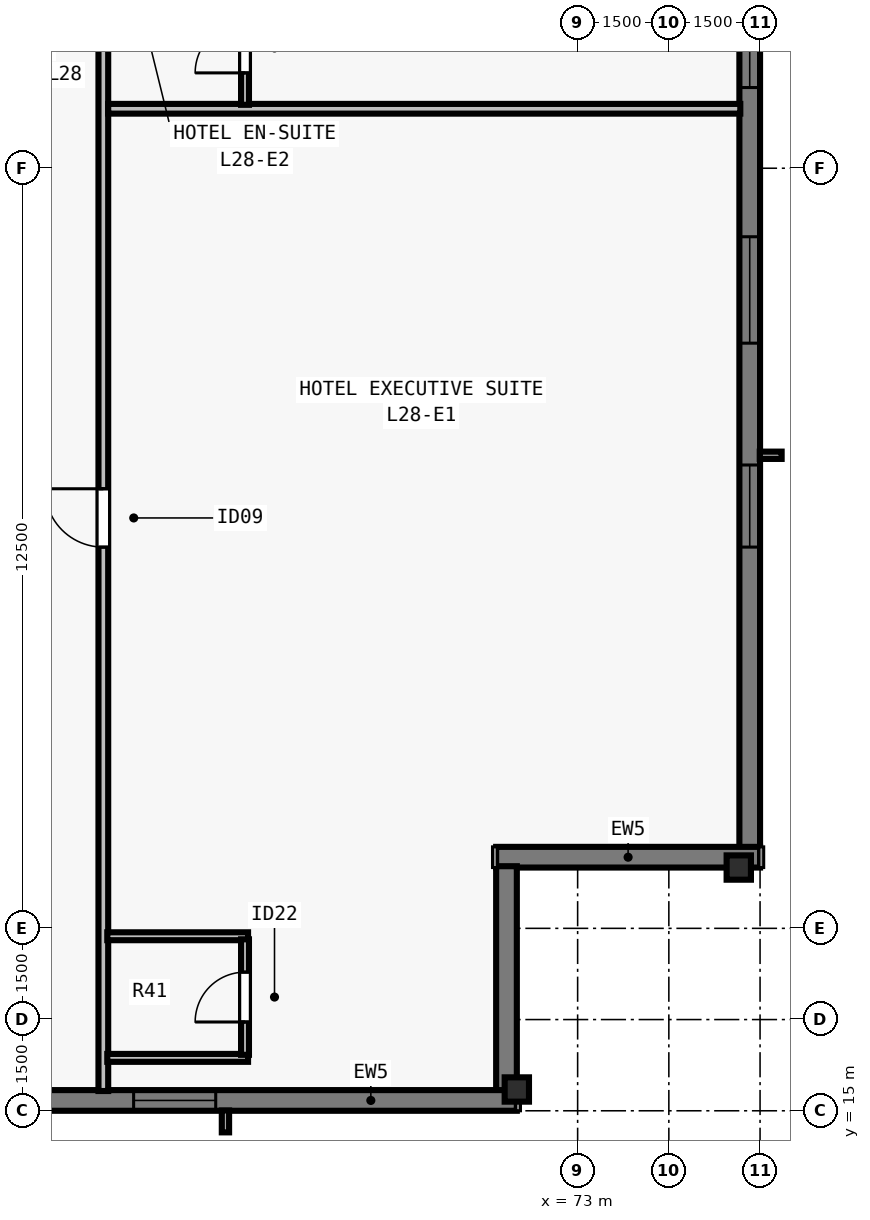
"""IFC4 building model, lengths in metres.
Left out: names, types, materials, properties, quantities, classifications, styles, units other than length and angle.
Written with IfcOpenShell. Run it as: python <this file> out.ifc"""

import sys

from ifc_helpers import new_model, si_unit, direction, frame, frame_2d, origin, origin_2d, place, context, subcontext, project, spatial, rectangle, i_section, extrude, element, fill, save


model = new_model("IFC4")
c1 = context("Model", 3, precision=1e-05, world=origin(), true_north=direction((0.0, 1.0)))
c2 = subcontext(c1, "Body", "Model", "MODEL_VIEW")
j1 = project(units=[si_unit("LENGTHUNIT", "METRE"), si_unit("PLANEANGLEUNIT", "RADIAN")], contexts=[c1])
p1 = place(None, origin())
s1 = spatial("IfcSite", under=j1, at=p1, CompositionType="ELEMENT")
p2 = place(p1, origin())
s2 = spatial("IfcBuilding", under=s1, at=p2, CompositionType="ELEMENT")
p3 = place(p2, frame((0.0, 0.0, 106.0)))
s3 = spatial("IfcBuildingStorey", under=s2, at=p3, CompositionType="ELEMENT", Elevation=106.0)
for number, where, z_axis, x_axis in (
    (1, (72.0, 15.35, 0.0), (0.0, 0.0, 1.0), (1.0, 0.0, 0.0)),
    (2, (75.65, 19.0, 0.0), (0.0, 0.0, 1.0), (0.0, 1.0, 0.0)),
):
    element("IfcColumn", number, at=place(p3, frame(where, z_axis=z_axis, x_axis=x_axis)), inside=s3, PredefinedType="COLUMN", context=c2, shape_type="SweptSolid", body=[
        extrude(i_section(OverallWidth=0.4, OverallDepth=0.4, WebThickness=0.022, FlangeThickness=0.036, at=origin_2d()), origin(), (0.0, 0.0, 1.0), 3.5),
    ])
p4 = place(p3, frame((75.83, 59.0, 0.0), z_axis=(0.0, 0.0, 1.0), x_axis=(0.0, -1.0, 0.0)))
e3 = element("IfcWall", 3, at=p4, inside=s3, PredefinedType="SOLIDWALL", context=c2, shape_type="SweptSolid", body=[
    extrude(rectangle(XDim=39.682, YDim=0.34, at=frame_2d((19.841, 0.0))), origin(), (0.0, 0.0, 1.0), 3.28),
])
p5 = place(p4, frame((4.952, 0.0, 0.8)))
e4 = element("IfcOpeningElement", 4, at=p5, cuts=e3, PredefinedType="OPENING", context=c2, shape_type="SweptSolid", body=[
    extrude(rectangle(XDim=1.35, YDim=1.66, at=frame_2d((0.675, 0.83))), frame((0.0, 0.18, 0.0), z_axis=(0.0, -1.0, 0.0), x_axis=(1.0, 0.0, 0.0)), (0.0, 0.0, 1.0), 0.36),
])
p6 = place(p4, frame((8.305, 0.0, 0.8)))
e5 = element("IfcOpeningElement", 5, at=p6, cuts=e3, PredefinedType="OPENING", context=c2, shape_type="SweptSolid", body=[
    extrude(rectangle(XDim=1.75, YDim=1.66, at=frame_2d((0.875, 0.83))), frame((0.0, 0.18, 0.0), z_axis=(0.0, -1.0, 0.0), x_axis=(1.0, 0.0, 0.0)), (0.0, 0.0, 1.0), 0.36),
])
p7 = place(p4, frame((12.909, 0.0, 0.8)))
e6 = element("IfcOpeningElement", 6, at=p7, cuts=e3, PredefinedType="OPENING", context=c2, shape_type="SweptSolid", body=[
    extrude(rectangle(XDim=1.35, YDim=1.66, at=frame_2d((0.675, 0.83))), frame((0.0, 0.18, 0.0), z_axis=(0.0, -1.0, 0.0), x_axis=(1.0, 0.0, 0.0)), (0.0, 0.0, 1.0), 0.36),
])
p8 = place(p4, frame((16.262, 0.0, 0.8)))
e7 = element("IfcOpeningElement", 7, at=p8, cuts=e3, PredefinedType="OPENING", context=c2, shape_type="SweptSolid", body=[
    extrude(rectangle(XDim=1.75, YDim=1.66, at=frame_2d((0.875, 0.83))), frame((0.0, 0.18, 0.0), z_axis=(0.0, -1.0, 0.0), x_axis=(1.0, 0.0, 0.0)), (0.0, 0.0, 1.0), 0.36),
])
p9 = place(p4, frame((19.166, 0.0, 0.8)))
e8 = element("IfcOpeningElement", 8, at=p9, cuts=e3, PredefinedType="OPENING", context=c2, shape_type="SweptSolid", body=[
    extrude(rectangle(XDim=1.35, YDim=1.66, at=frame_2d((0.675, 0.83))), frame((0.0, 0.18, 0.0), z_axis=(0.0, -1.0, 0.0), x_axis=(1.0, 0.0, 0.0)), (0.0, 0.0, 1.0), 0.36),
])
p10 = place(p4, frame((22.07, 0.0, 0.8)))
e9 = element("IfcOpeningElement", 9, at=p10, cuts=e3, PredefinedType="OPENING", context=c2, shape_type="SweptSolid", body=[
    extrude(rectangle(XDim=1.75, YDim=1.66, at=frame_2d((0.875, 0.83))), frame((0.0, 0.18, 0.0), z_axis=(0.0, -1.0, 0.0), x_axis=(1.0, 0.0, 0.0)), (0.0, 0.0, 1.0), 0.36),
])
p11 = place(p4, frame((25.823, 0.0, 0.8)))
e10 = element("IfcOpeningElement", 10, at=p11, cuts=e3, PredefinedType="OPENING", context=c2, shape_type="SweptSolid", body=[
    extrude(rectangle(XDim=1.35, YDim=1.66, at=frame_2d((0.675, 0.83))), frame((0.0, 0.18, 0.0), z_axis=(0.0, -1.0, 0.0), x_axis=(1.0, 0.0, 0.0)), (0.0, 0.0, 1.0), 0.36),
])
p12 = place(p4, frame((29.627, 0.0, 0.8)))
e11 = element("IfcOpeningElement", 11, at=p12, cuts=e3, PredefinedType="OPENING", context=c2, shape_type="SweptSolid", body=[
    extrude(rectangle(XDim=1.75, YDim=1.66, at=frame_2d((0.875, 0.83))), frame((0.0, 0.18, 0.0), z_axis=(0.0, -1.0, 0.0), x_axis=(1.0, 0.0, 0.0)), (0.0, 0.0, 1.0), 0.36),
])
p13 = place(p4, frame((33.38, 0.0, 0.8)))
e12 = element("IfcOpeningElement", 12, at=p13, cuts=e3, PredefinedType="OPENING", context=c2, shape_type="SweptSolid", body=[
    extrude(rectangle(XDim=1.35, YDim=1.66, at=frame_2d((0.675, 0.83))), frame((0.0, 0.18, 0.0), z_axis=(0.0, -1.0, 0.0), x_axis=(1.0, 0.0, 0.0)), (0.0, 0.0, 1.0), 0.36),
])
p14 = place(p3, frame((76.0, 19.17, 0.0), z_axis=(0.0, 0.0, 1.0), x_axis=(-1.0, 0.0, 0.0)))
e13 = element("IfcWall", 13, at=p14, inside=s3, PredefinedType="SOLIDWALL", context=c2, shape_type="SweptSolid", body=[
    extrude(rectangle(XDim=4.34, YDim=0.34, at=frame_2d((2.17, 0.0))), origin(), (0.0, 0.0, 1.0), 3.28),
])
p15 = place(p3, frame((71.83, 19.022, 0.0), z_axis=(0.0, 0.0, 1.0), x_axis=(0.0, -1.0, 0.0)))
e14 = element("IfcWall", 14, at=p15, inside=s3, PredefinedType="SOLIDWALL", context=c2, shape_type="SweptSolid", body=[
    extrude(rectangle(XDim=3.704, YDim=0.34, at=frame_2d((1.852, 0.0))), origin(), (0.0, 0.0, 1.0), 3.28),
])
p16 = place(p3, frame((72.0, 15.17, 0.0), z_axis=(0.0, 0.0, 1.0), x_axis=(-1.0, 0.0, 0.0)))
e15 = element("IfcWall", 15, at=p16, inside=s3, PredefinedType="SOLIDWALL", context=c2, shape_type="SweptSolid", body=[
    extrude(rectangle(XDim=39.682, YDim=0.34, at=frame_2d((19.841, 0.0))), origin(), (0.0, 0.0, 1.0), 3.28),
])
p17 = place(p16, frame((4.952, 0.0, 0.8)))
e16 = element("IfcOpeningElement", 16, at=p17, cuts=e15, PredefinedType="OPENING", context=c2, shape_type="SweptSolid", body=[
    extrude(rectangle(XDim=1.35, YDim=1.66, at=frame_2d((0.675, 0.83))), frame((0.0, 0.18, 0.0), z_axis=(0.0, -1.0, 0.0), x_axis=(1.0, 0.0, 0.0)), (0.0, 0.0, 1.0), 0.36),
])
p18 = place(p16, frame((9.555, 0.0, 0.8)))
e17 = element("IfcOpeningElement", 17, at=p18, cuts=e15, PredefinedType="OPENING", context=c2, shape_type="SweptSolid", body=[
    extrude(rectangle(XDim=1.75, YDim=1.66, at=frame_2d((0.875, 0.83))), frame((0.0, 0.18, 0.0), z_axis=(0.0, -1.0, 0.0), x_axis=(1.0, 0.0, 0.0)), (0.0, 0.0, 1.0), 0.36),
])
p19 = place(p16, frame((12.059, 0.0, 0.8)))
e18 = element("IfcOpeningElement", 18, at=p19, cuts=e15, PredefinedType="OPENING", context=c2, shape_type="SweptSolid", body=[
    extrude(rectangle(XDim=1.35, YDim=1.66, at=frame_2d((0.675, 0.83))), frame((0.0, 0.18, 0.0), z_axis=(0.0, -1.0, 0.0), x_axis=(1.0, 0.0, 0.0)), (0.0, 0.0, 1.0), 0.36),
])
p20 = place(p16, frame((16.262, 0.0, 0.8)))
e19 = element("IfcOpeningElement", 19, at=p20, cuts=e15, PredefinedType="OPENING", context=c2, shape_type="SweptSolid", body=[
    extrude(rectangle(XDim=1.75, YDim=1.66, at=frame_2d((0.875, 0.83))), frame((0.0, 0.18, 0.0), z_axis=(0.0, -1.0, 0.0), x_axis=(1.0, 0.0, 0.0)), (0.0, 0.0, 1.0), 0.36),
])
p21 = place(p16, frame((18.716, 0.0, 0.8)))
e20 = element("IfcOpeningElement", 20, at=p21, cuts=e15, PredefinedType="OPENING", context=c2, shape_type="SweptSolid", body=[
    extrude(rectangle(XDim=1.35, YDim=1.66, at=frame_2d((0.675, 0.83))), frame((0.0, 0.18, 0.0), z_axis=(0.0, -1.0, 0.0), x_axis=(1.0, 0.0, 0.0)), (0.0, 0.0, 1.0), 0.36),
])
p22 = place(p16, frame((22.07, 0.0, 0.8)))
e21 = element("IfcOpeningElement", 21, at=p22, cuts=e15, PredefinedType="OPENING", context=c2, shape_type="SweptSolid", body=[
    extrude(rectangle(XDim=1.75, YDim=1.66, at=frame_2d((0.875, 0.83))), frame((0.0, 0.18, 0.0), z_axis=(0.0, -1.0, 0.0), x_axis=(1.0, 0.0, 0.0)), (0.0, 0.0, 1.0), 0.36),
])
p23 = place(p16, frame((26.273, 0.0, 0.8)))
e22 = element("IfcOpeningElement", 22, at=p23, cuts=e15, PredefinedType="OPENING", context=c2, shape_type="SweptSolid", body=[
    extrude(rectangle(XDim=1.35, YDim=1.66, at=frame_2d((0.675, 0.83))), frame((0.0, 0.18, 0.0), z_axis=(0.0, -1.0, 0.0), x_axis=(1.0, 0.0, 0.0)), (0.0, 0.0, 1.0), 0.36),
])
p24 = place(p16, frame((28.777, 0.0, 0.8)))
e23 = element("IfcOpeningElement", 23, at=p24, cuts=e15, PredefinedType="OPENING", context=c2, shape_type="SweptSolid", body=[
    extrude(rectangle(XDim=1.75, YDim=1.66, at=frame_2d((0.875, 0.83))), frame((0.0, 0.18, 0.0), z_axis=(0.0, -1.0, 0.0), x_axis=(1.0, 0.0, 0.0)), (0.0, 0.0, 1.0), 0.36),
])
p25 = place(p16, frame((33.83, 0.0, 0.8)))
e24 = element("IfcOpeningElement", 24, at=p25, cuts=e15, PredefinedType="OPENING", context=c2, shape_type="SweptSolid", body=[
    extrude(rectangle(XDim=1.35, YDim=1.66, at=frame_2d((0.675, 0.83))), frame((0.0, 0.18, 0.0), z_axis=(0.0, -1.0, 0.0), x_axis=(1.0, 0.0, 0.0)), (0.0, 0.0, 1.0), 0.36),
])
p26 = place(p3, frame((65.2, 15.325, 0.0), z_axis=(0.0, 0.0, 1.0), x_axis=(0.0, 1.0, 0.0)))
e25 = element("IfcWall", 25, at=p26, inside=s3, PredefinedType="PARTITIONING", context=c2, shape_type="SweptSolid", body=[
    extrude(rectangle(XDim=47.35, YDim=0.16, at=frame_2d((23.675, 0.0))), origin(), (0.0, 0.0, 1.0), 2.555),
])
p27 = place(p26, frame((8.944, 0.0, 0.0)))
e26 = element("IfcOpeningElement", 26, at=p27, cuts=e25, PredefinedType="OPENING", context=c2, shape_type="SweptSolid", body=[
    extrude(rectangle(XDim=0.96, YDim=2.15, at=frame_2d((0.48, 1.075))), frame((0.0, 0.09, 0.0), z_axis=(0.0, -1.0, 0.0), x_axis=(1.0, 0.0, 0.0)), (0.0, 0.0, 1.0), 0.18),
])
p28 = place(p26, frame((24.322, 0.0, 0.0)))
e27 = element("IfcOpeningElement", 27, at=p28, cuts=e25, PredefinedType="OPENING", context=c2, shape_type="SweptSolid", body=[
    extrude(rectangle(XDim=0.96, YDim=2.15, at=frame_2d((0.48, 1.075))), frame((0.0, 0.09, 0.0), z_axis=(0.0, -1.0, 0.0), x_axis=(1.0, 0.0, 0.0)), (0.0, 0.0, 1.0), 0.18),
])
p29 = place(p26, frame((39.873, 0.0, 0.0)))
e28 = element("IfcOpeningElement", 28, at=p29, cuts=e25, PredefinedType="OPENING", context=c2, shape_type="SweptSolid", body=[
    extrude(rectangle(XDim=0.96, YDim=2.15, at=frame_2d((0.48, 1.075))), frame((0.0, 0.09, 0.0), z_axis=(0.0, -1.0, 0.0), x_axis=(1.0, 0.0, 0.0)), (0.0, 0.0, 1.0), 0.18),
])
for number, where, z_axis, x_axis in (
    (29, (65.265, 15.87, 0.0), (0.0, 0.0, 1.0), (1.0, 0.0, 0.0)),
    (30, (65.265, 17.87, 0.0), (0.0, 0.0, 1.0), (1.0, 0.0, 0.0)),
):
    element("IfcWall", number, at=place(p3, frame(where, z_axis=z_axis, x_axis=x_axis)), inside=s3, PredefinedType="PLUMBINGWALL", context=c2, shape_type="SweptSolid", body=[
        extrude(rectangle(XDim=2.315, YDim=0.13, at=frame_2d((1.158, 0.0))), origin(), (0.0, 0.0, 1.0), 3.28),
    ])
p30 = place(p3, frame((67.53, 15.92, 0.0), z_axis=(0.0, 0.0, 1.0), x_axis=(0.0, 1.0, 0.0)))
e31 = element("IfcWall", 31, at=p30, inside=s3, PredefinedType="PLUMBINGWALL", context=c2, shape_type="SweptSolid", body=[
    extrude(rectangle(XDim=1.9, YDim=0.13, at=frame_2d((0.95, 0.0))), origin(), (0.0, 0.0, 1.0), 3.28),
])
p31 = place(p30, frame((0.54, 0.0, 0.0)))
e32 = element("IfcOpeningElement", 32, at=p31, cuts=e31, PredefinedType="OPENING", context=c2, shape_type="SweptSolid", body=[
    extrude(rectangle(XDim=0.82, YDim=2.1, at=frame_2d((0.41, 1.05))), frame((0.0, 0.075, 0.0), z_axis=(0.0, -1.0, 0.0), x_axis=(1.0, 0.0, 0.0)), (0.0, 0.0, 1.0), 0.15),
])
p32 = place(p3, frame((65.28, 31.478, 0.0), z_axis=(0.0, 0.0, 1.0), x_axis=(1.0, 0.0, 0.0)))
e33 = element("IfcWall", 33, at=p32, inside=s3, PredefinedType="PARTITIONING", context=c2, shape_type="SweptSolid", body=[
    extrude(rectangle(XDim=10.395, YDim=0.16, at=frame_2d((5.198, 0.0))), origin(), (0.0, 0.0, 1.0), 3.28),
])
p33 = place(p3, frame((67.53, 31.543, 0.0), z_axis=(0.0, 0.0, 1.0), x_axis=(0.0, 1.0, 0.0)))
e34 = element("IfcWall", 34, at=p33, inside=s3, PredefinedType="PLUMBINGWALL", context=c2, shape_type="SweptSolid", body=[
    extrude(rectangle(XDim=1.885, YDim=0.13, at=frame_2d((0.942, 0.0))), origin(), (0.0, 0.0, 1.0), 3.28),
])
p34 = place(p33, frame((0.525, 0.0, 0.0)))
e35 = element("IfcOpeningElement", 35, at=p34, cuts=e34, PredefinedType="OPENING", context=c2, shape_type="SweptSolid", body=[
    extrude(rectangle(XDim=0.82, YDim=2.1, at=frame_2d((0.41, 1.05))), frame((0.0, 0.075, 0.0), z_axis=(0.0, -1.0, 0.0), x_axis=(1.0, 0.0, 0.0)), (0.0, 0.0, 1.0), 0.15),
])
p35 = place(p11, origin())
e36 = element("IfcWindow", 36, at=p35, inside=s3, PartitioningType="SINGLE_PANEL", PredefinedType="WINDOW", context=c2, shape_type="SweptSolid", body=[
    extrude(rectangle(XDim=1.35, YDim=1.66, at=frame_2d((0.675, 0.83))), frame((0.0, -0.05, 0.0), z_axis=(0.0, -1.0, 0.0), x_axis=(1.0, 0.0, 0.0)), (0.0, 0.0, 1.0), 0.06),
])
fill(e10, e36)
p36 = place(p12, origin())
e37 = element("IfcWindow", 37, at=p36, inside=s3, PartitioningType="SINGLE_PANEL", PredefinedType="WINDOW", context=c2, shape_type="SweptSolid", body=[
    extrude(rectangle(XDim=1.75, YDim=1.66, at=frame_2d((0.875, 0.83))), frame((0.0, -0.05, 0.0), z_axis=(0.0, -1.0, 0.0), x_axis=(1.0, 0.0, 0.0)), (0.0, 0.0, 1.0), 0.06),
])
fill(e11, e37)
p37 = place(p13, origin())
e38 = element("IfcWindow", 38, at=p37, inside=s3, PartitioningType="SINGLE_PANEL", PredefinedType="WINDOW", context=c2, shape_type="SweptSolid", body=[
    extrude(rectangle(XDim=1.35, YDim=1.66, at=frame_2d((0.675, 0.83))), frame((0.0, -0.05, 0.0), z_axis=(0.0, -1.0, 0.0), x_axis=(1.0, 0.0, 0.0)), (0.0, 0.0, 1.0), 0.06),
])
fill(e12, e38)
p38 = place(p17, origin())
e39 = element("IfcWindow", 39, at=p38, inside=s3, PartitioningType="SINGLE_PANEL", PredefinedType="WINDOW", context=c2, shape_type="SweptSolid", body=[
    extrude(rectangle(XDim=1.35, YDim=1.66, at=frame_2d((0.675, 0.83))), frame((0.0, -0.05, 0.0), z_axis=(0.0, -1.0, 0.0), x_axis=(1.0, 0.0, 0.0)), (0.0, 0.0, 1.0), 0.06),
])
fill(e16, e39)
p39 = place(p31, origin())
e40 = element("IfcDoor", 40, at=p39, inside=s3, OperationType="SINGLE_SWING_LEFT", PredefinedType="DOOR", context=c2, shape_type="SweptSolid", body=[
    extrude(rectangle(XDim=0.82, YDim=2.1, at=frame_2d((0.41, 1.05))), frame((0.0, 0.025, 0.0), z_axis=(0.0, -1.0, 0.0), x_axis=(1.0, 0.0, 0.0)), (0.0, 0.0, 1.0), 0.05),
])
fill(e32, e40)
p40 = place(p27, origin())
e41 = element("IfcDoor", 41, at=p40, inside=s3, OperationType="SINGLE_SWING_RIGHT", PredefinedType="DOOR", context=c2, shape_type="SweptSolid", body=[
    extrude(rectangle(XDim=0.96, YDim=2.15, at=frame_2d((0.48, 1.075))), frame((0.0, 0.025, 0.0), z_axis=(0.0, -1.0, 0.0), x_axis=(1.0, 0.0, 0.0)), (0.0, 0.0, 1.0), 0.05),
])
fill(e26, e41)
p41 = place(p34, origin())
e42 = element("IfcDoor", 42, at=p41, inside=s3, OperationType="SINGLE_SWING_LEFT", PredefinedType="DOOR", context=c2, shape_type="SweptSolid", body=[
    extrude(rectangle(XDim=0.82, YDim=2.1, at=frame_2d((0.41, 1.05))), frame((0.0, 0.025, 0.0), z_axis=(0.0, -1.0, 0.0), x_axis=(1.0, 0.0, 0.0)), (0.0, 0.0, 1.0), 0.05),
])
fill(e35, e42)
save(model, sys.argv[1])
